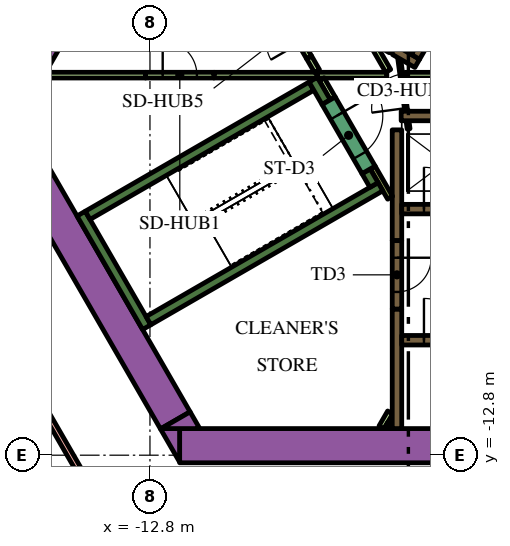
"""IFC4 building model, lengths in metres.
Left out: names, types, materials, properties, quantities, classifications, styles, units other than length and angle.
Written with IfcOpenShell. Run it as: python <this file> out.ifc"""

import sys

from ifc_helpers import new_model, si_unit, direction, frame, frame_2d, origin, place, context, subcontext, project, spatial, polyline, rectangle, outline, extrude, element, fill, save


model = new_model("IFC4")
c1 = context("Model", 3, precision=1e-05, world=origin(), true_north=direction((0.0, 1.0)))
c2 = subcontext(c1, "Body", "Model", "MODEL_VIEW")
j1 = project(units=[si_unit("LENGTHUNIT", "METRE"), si_unit("PLANEANGLEUNIT", "RADIAN")], contexts=[c1])
p1 = place(None, origin())
s1 = spatial("IfcSite", under=j1, at=p1, CompositionType="ELEMENT")
p2 = place(p1, origin())
s2 = spatial("IfcBuilding", under=s1, at=p2, CompositionType="ELEMENT")
p3 = place(p2, frame((0.0, 0.0, 134.4)))
s3 = spatial("IfcBuildingStorey", under=s2, at=p3, CompositionType="ELEMENT", Elevation=134.4)
p4 = place(p3, frame((-12.019, -12.55, 0.0), z_axis=(0.0, 0.0, 1.0), x_axis=(1.0, 0.0, 0.0)))
e1 = element("IfcWall", 1, at=p4, inside=s3, PredefinedType="SOLIDWALL", context=c2, shape_type="SweptSolid", body=[
    extrude(rectangle(XDim=21.63, YDim=0.9, at=frame_2d((10.815, 0.0))), origin(), (0.0, 0.0, 1.0), 7.2),
])
p5 = place(p3, origin())
e2 = element("IfcWall", 2, at=p5, inside=s3, PredefinedType="SOLIDWALL", context=c2, shape_type="SweptSolid", body=[
    extrude(outline(polyline([(-12.529, -12.1), (-12.021, -12.1), (-12.021, -12.98), (-12.529, -12.1)])), origin(), (0.0, 0.0, 1.0), 7.2),
])
p6 = place(p3, frame((-12.134, -11.883, 0.0), z_axis=(0.0, 0.0, 1.0), x_axis=(-0.500005339912, 0.866022320763, 0.0)))
e3 = element("IfcWall", 3, at=p6, inside=s3, PredefinedType="SOLIDWALL", context=c2, shape_type="SweptSolid", body=[
    extrude(rectangle(XDim=9.488, YDim=0.9, at=frame_2d((4.744, 0.0))), origin(), (0.0, 0.0, 1.0), 7.2),
])
e4 = element("IfcWall", 4, at=p5, inside=s3, PredefinedType="SOLIDWALL", context=c2, shape_type="SweptSolid", body=[
    extrude(outline(polyline([(-11.489, -12.1), (-12.505, -12.1), (-11.743, -11.66), (-11.489, -12.1)])), origin(), (0.0, 0.0, 1.0), 7.2),
])
p7 = place(p3, frame((-15.118, -1.085, 0.0), z_axis=(0.0, 0.0, 1.0), x_axis=(-0.50006606081, -0.865987260198, 0.0)))
e5 = element("IfcWall", 5, at=p7, inside=s3, PredefinedType="SOLIDWALL", context=c2, shape_type="SweptSolid", body=[
    extrude(rectangle(XDim=2.481, YDim=0.9, at=frame_2d((1.24, 0.0))), origin(), (0.0, 0.0, 1.0), 7.2),
])
p8 = place(p3, frame((-12.885, -9.431, 0.0), z_axis=(0.0, 0.0, 1.0), x_axis=(-0.500020560727, 0.866013532718, 0.0)))
e6 = element("IfcWall", 6, at=p8, inside=s3, PredefinedType="SOLIDWALL", context=c2, shape_type="SweptSolid", body=[
    extrude(rectangle(XDim=3.45, YDim=0.25, at=frame_2d((1.725, 0.0))), origin(), (0.0, 0.0, 1.0), 7.2),
])
p9 = place(p3, frame((-14.44, -6.49, 0.0), z_axis=(0.0, 0.0, 1.0), x_axis=(0.866022966069, 0.500004222222, 0.0)))
e7 = element("IfcWall", 7, at=p9, inside=s3, PredefinedType="SOLIDWALL", context=c2, shape_type="SweptSolid", body=[
    extrude(rectangle(XDim=6.8, YDim=0.25, at=frame_2d((3.4, 0.0))), origin(), (0.0, 0.0, 1.0), 7.2),
])
p10 = place(p3, frame((-8.163, -3.511, 0.0), z_axis=(0.0, 0.0, 1.0), x_axis=(-0.500206266495, 0.865906283012, 0.0)))
e8 = element("IfcWall", 8, at=p10, inside=s3, PredefinedType="SOLIDWALL", context=c2, shape_type="SweptSolid", body=[
    extrude(rectangle(XDim=0.684, YDim=0.25, at=frame_2d((0.342, 0.0))), origin(), (0.0, 0.0, 1.0), 7.2),
])
p11 = place(p3, frame((-12.84, -9.261, 0.0), z_axis=(0.0, 0.0, 1.0), x_axis=(0.866016039709, 0.500016218704, 0.0)))
e9 = element("IfcWall", 9, at=p11, inside=s3, PredefinedType="SOLIDWALL", context=c2, shape_type="SweptSolid", body=[
    extrude(rectangle(XDim=7.05, YDim=0.25, at=frame_2d((3.525, 0.0))), origin(), (0.0, 0.0, 1.0), 7.2),
])
p12 = place(p3, frame((-6.905, -5.69, 0.0), z_axis=(0.0, 0.0, 1.0), x_axis=(-0.499993700073, 0.866029041019, 0.0)))
e10 = element("IfcWall", 10, at=p12, inside=s3, PredefinedType="SOLIDWALL", context=c2, shape_type="SweptSolid", body=[
    extrude(rectangle(XDim=0.416, YDim=0.25, at=frame_2d((0.208, 0.0))), origin(), (0.0, 0.0, 1.0), 7.2),
])
p13 = place(p3, frame((-6.3, -12.1, 0.0), z_axis=(0.0, 0.0, 1.0), x_axis=(0.0, 1.0, 0.0)))
e11 = element("IfcWall", 11, at=p13, inside=s3, PredefinedType="SOLIDWALL", context=c2, shape_type="SweptSolid", body=[
    extrude(rectangle(XDim=3.146, YDim=0.25, at=frame_2d((1.573, 0.0))), origin(), (0.0, 0.0, 1.0), 7.2),
])
p14 = place(p3, frame((-6.3, -4.24, 0.0), z_axis=(0.0, 0.0, 1.0), x_axis=(0.0, -1.0, 0.0)))
e12 = element("IfcWall", 12, at=p14, inside=s3, PredefinedType="SOLIDWALL", context=c2, shape_type="SweptSolid", body=[
    extrude(rectangle(XDim=2.914, YDim=0.25, at=frame_2d((1.457, 0.0))), origin(), (0.0, 0.0, 1.0), 7.2),
])
p15 = place(p3, frame((-6.19, -3.875, 0.0), z_axis=(0.0, 0.0, 1.0), x_axis=(1.0, 0.0, 0.0)))
e13 = element("IfcWall", 13, at=p15, inside=s3, PredefinedType="SOLIDWALL", context=c2, shape_type="SweptSolid", body=[
    extrude(rectangle(XDim=12.615, YDim=0.25, at=frame_2d((6.307, 0.0))), origin(), (0.0, 0.0, 1.0), 7.2),
])
e14 = element("IfcWall", 14, at=p5, inside=s3, PredefinedType="SOLIDWALL", context=c2, shape_type="SweptSolid", body=[
    extrude(outline(polyline([(-5.922, -2.257), (-5.922, -2.257), (-5.705, -2.382), (-5.83, -2.598), (-6.418, -2.258), (-6.433, -2.153), (-6.433, -2.153), (-6.433, -2.153), (-6.508, -2.163), (-6.508, -2.163), (-6.508, -2.163), (-6.501, -2.21), (-7.952, -1.373), (-7.827, -1.156), (-5.922, -2.257)])), origin(), (0.0, 0.0, 1.0), 7.2),
])
p16 = place(p3, frame((-6.708, -12.068, 0.0), z_axis=(0.0, 0.0, 1.0), x_axis=(0.500000789788, 0.8660249478, 0.0)))
e15 = element("IfcWall", 15, at=p16, inside=s3, PredefinedType="PARTITIONING", context=c2, shape_type="SweptSolid", body=[
    extrude(rectangle(XDim=0.456, YDim=0.15, at=frame_2d((0.228, 0.0))), origin(), (0.0, 0.0, 1.0), 6.15),
])
p17 = place(p3, frame((-6.534, -12.068, 0.0), z_axis=(0.0, 0.0, 1.0), x_axis=(0.500240224089, 0.865886665912, 0.0)))
e16 = element("IfcWall", 16, at=p17, inside=s3, PredefinedType="PARTITIONING", context=c2, shape_type="SweptSolid", body=[
    extrude(rectangle(XDim=0.109, YDim=0.15, at=frame_2d((0.054, 0.0))), origin(), (0.0, 0.0, 1.0), 6.15),
])
p18 = place(p3, frame((-6.48, -6.027, 0.0), z_axis=(0.0, 0.0, 1.0), x_axis=(-0.499936960004, 0.866061796884, 0.0)))
e17 = element("IfcWall", 17, at=p18, inside=s3, PredefinedType="PARTITIONING", context=c2, shape_type="SweptSolid", body=[
    extrude(rectangle(XDim=0.919, YDim=0.15, at=frame_2d((0.46, 0.0))), origin(), (0.0, 0.0, 1.0), 7.2),
])
p19 = place(p3, frame((-12.915, -2.8, 0.0), z_axis=(0.0, 0.0, 1.0), x_axis=(-1.0, 0.0, 0.0)))
e18 = element("IfcWall", 18, at=p19, inside=s3, PredefinedType="PARTITIONING", context=c2, shape_type="SweptSolid", body=[
    extrude(rectangle(XDim=2.637, YDim=0.15, at=frame_2d((1.318, 0.0))), origin(), (0.0, 0.0, 1.0), 6.15),
])
p20 = place(p3, frame((-8.395, -2.8, 0.0), z_axis=(0.0, 0.0, 1.0), x_axis=(1.0, 0.0, 0.0)))
e19 = element("IfcWall", 19, at=p20, inside=s3, PredefinedType="PARTITIONING", context=c2, shape_type="SweptSolid", body=[
    extrude(rectangle(XDim=1.828, YDim=0.15, at=frame_2d((0.914, 0.0))), origin(), (0.0, 0.0, 1.0), 6.15),
])
p21 = place(p3, frame((-11.115, -2.8, 0.0), z_axis=(0.0, 0.0, 1.0), x_axis=(1.0, 0.0, 0.0)))
e20 = element("IfcWall", 20, at=p21, inside=s3, PredefinedType="PARTITIONING", context=c2, shape_type="SweptSolid", body=[
    extrude(rectangle(XDim=2.708, YDim=0.15, at=frame_2d((1.354, 0.0))), origin(), (0.0, 0.0, 1.0), 6.15),
])
p22 = place(p3, frame((-6.531, -2.689, 0.0), z_axis=(0.0, 0.0, 1.0), x_axis=(-0.499967446111, 0.866044197965, 0.0)))
e21 = element("IfcWall", 21, at=p22, inside=s3, PredefinedType="PARTITIONING", context=c2, shape_type="SweptSolid", body=[
    extrude(rectangle(XDim=0.748, YDim=0.15, at=frame_2d((0.374, 0.0))), origin(), (0.0, 0.0, 1.0), 6.15),
])
p23 = place(p3, frame((-7.99, -3.412, 0.0), z_axis=(0.0, 0.0, 1.0), x_axis=(-0.500193841991, 0.86591346013, 0.0)))
e22 = element("IfcWall", 22, at=p23, inside=s3, PredefinedType="PARTITIONING", context=c2, shape_type="SweptSolid", body=[
    extrude(rectangle(XDim=0.583, YDim=0.15, at=frame_2d((0.292, 0.0))), origin(), (0.0, 0.0, 1.0), 6.15),
])
p24 = place(p3, frame((-8.612, -2.333, 0.0), z_axis=(0.0, 0.0, 1.0), x_axis=(0.500248216681, -0.86588204838, 0.0)))
e23 = element("IfcWall", 23, at=p24, inside=s3, PredefinedType="PARTITIONING", context=c2, shape_type="SweptSolid", body=[
    extrude(rectangle(XDim=0.415, YDim=0.15, at=frame_2d((0.208, 0.0))), origin(), (0.0, 0.0, 1.0), 6.15),
])
p25 = place(p3, frame((-6.086, -2.801, 0.0), z_axis=(0.0, 0.0, 1.0), x_axis=(1.0, 0.0, 0.0)))
e24 = element("IfcWall", 24, at=p25, inside=s3, PredefinedType="PARTITIONING", context=c2, shape_type="SweptSolid", body=[
    extrude(rectangle(XDim=7.524, YDim=0.15, at=frame_2d((3.762, 0.0))), origin(), (0.0, 0.0, 1.0), 6.15),
])
p26 = place(p3, frame((-6.175, -9.775, 0.0), z_axis=(0.0, 0.0, 1.0), x_axis=(1.0, 0.0, 0.0)))
e25 = element("IfcWall", 25, at=p26, inside=s3, PredefinedType="SOLIDWALL", context=c2, shape_type="SweptSolid", body=[
    extrude(rectangle(XDim=12.35, YDim=0.25, at=frame_2d((6.175, 0.0))), origin(), (0.0, 0.0, 1.0), 7.2),
])
p27 = place(p26, frame((0.585, 0.0, 0.0)))
e26 = element("IfcOpeningElement", 26, at=p27, cuts=e25, PredefinedType="OPENING", context=c2, shape_type="SweptSolid", body=[
    extrude(rectangle(XDim=1.1, YDim=2.1, at=frame_2d((0.55, 1.05))), frame((0.0, 0.135, 0.0), z_axis=(0.0, -1.0, 0.0), x_axis=(1.0, 0.0, 0.0)), (0.0, 0.0, 1.0), 0.27),
])
p28 = place(p26, frame((3.105, 0.0, 0.0)))
e27 = element("IfcOpeningElement", 27, at=p28, cuts=e25, PredefinedType="OPENING", context=c2, shape_type="SweptSolid", body=[
    extrude(rectangle(XDim=1.1, YDim=2.1, at=frame_2d((0.55, 1.05))), frame((0.0, 0.135, 0.0), z_axis=(0.0, -1.0, 0.0), x_axis=(1.0, 0.0, 0.0)), (0.0, 0.0, 1.0), 0.27),
])
p29 = place(p26, frame((5.625, 0.0, 0.0)))
e28 = element("IfcOpeningElement", 28, at=p29, cuts=e25, PredefinedType="OPENING", context=c2, shape_type="SweptSolid", body=[
    extrude(rectangle(XDim=1.1, YDim=2.1, at=frame_2d((0.55, 1.05))), frame((0.0, 0.135, 0.0), z_axis=(0.0, -1.0, 0.0), x_axis=(1.0, 0.0, 0.0)), (0.0, 0.0, 1.0), 0.27),
])
p30 = place(p26, frame((8.145, 0.0, 0.0)))
e29 = element("IfcOpeningElement", 29, at=p30, cuts=e25, PredefinedType="OPENING", context=c2, shape_type="SweptSolid", body=[
    extrude(rectangle(XDim=1.1, YDim=2.1, at=frame_2d((0.55, 1.05))), frame((0.0, 0.135, 0.0), z_axis=(0.0, -1.0, 0.0), x_axis=(1.0, 0.0, 0.0)), (0.0, 0.0, 1.0), 0.27),
])
p31 = place(p26, frame((10.665, 0.0, 0.0)))
e30 = element("IfcOpeningElement", 30, at=p31, cuts=e25, PredefinedType="OPENING", context=c2, shape_type="SweptSolid", body=[
    extrude(rectangle(XDim=1.1, YDim=2.1, at=frame_2d((0.55, 1.05))), frame((0.0, 0.135, 0.0), z_axis=(0.0, -1.0, 0.0), x_axis=(1.0, 0.0, 0.0)), (0.0, 0.0, 1.0), 0.27),
])
p32 = place(p3, frame((-6.175, -6.325, 0.0), z_axis=(0.0, 0.0, 1.0), x_axis=(1.0, 0.0, 0.0)))
e31 = element("IfcWall", 31, at=p32, inside=s3, PredefinedType="SOLIDWALL", context=c2, shape_type="SweptSolid", body=[
    extrude(rectangle(XDim=12.35, YDim=0.25, at=frame_2d((6.175, 0.0))), origin(), (0.0, 0.0, 1.0), 7.2),
])
p33 = place(p32, frame((0.585, 0.0, 0.0)))
e32 = element("IfcOpeningElement", 32, at=p33, cuts=e31, PredefinedType="OPENING", context=c2, shape_type="SweptSolid", body=[
    extrude(rectangle(XDim=1.1, YDim=2.1, at=frame_2d((0.55, 1.05))), frame((0.0, 0.135, 0.0), z_axis=(0.0, -1.0, 0.0), x_axis=(1.0, 0.0, 0.0)), (0.0, 0.0, 1.0), 0.27),
])
p34 = place(p32, frame((3.105, 0.0, 0.0)))
e33 = element("IfcOpeningElement", 33, at=p34, cuts=e31, PredefinedType="OPENING", context=c2, shape_type="SweptSolid", body=[
    extrude(rectangle(XDim=1.1, YDim=2.1, at=frame_2d((0.55, 1.05))), frame((0.0, 0.135, 0.0), z_axis=(0.0, -1.0, 0.0), x_axis=(1.0, 0.0, 0.0)), (0.0, 0.0, 1.0), 0.27),
])
p35 = place(p32, frame((5.625, 0.0, 0.0)))
e34 = element("IfcOpeningElement", 34, at=p35, cuts=e31, PredefinedType="OPENING", context=c2, shape_type="SweptSolid", body=[
    extrude(rectangle(XDim=1.1, YDim=2.1, at=frame_2d((0.55, 1.05))), frame((0.0, 0.135, 0.0), z_axis=(0.0, -1.0, 0.0), x_axis=(1.0, 0.0, 0.0)), (0.0, 0.0, 1.0), 0.27),
])
p36 = place(p32, frame((8.145, 0.0, 0.0)))
e35 = element("IfcOpeningElement", 35, at=p36, cuts=e31, PredefinedType="OPENING", context=c2, shape_type="SweptSolid", body=[
    extrude(rectangle(XDim=1.1, YDim=2.1, at=frame_2d((0.55, 1.05))), frame((0.0, 0.135, 0.0), z_axis=(0.0, -1.0, 0.0), x_axis=(1.0, 0.0, 0.0)), (0.0, 0.0, 1.0), 0.27),
])
p37 = place(p32, frame((10.665, 0.0, 0.0)))
e36 = element("IfcOpeningElement", 36, at=p37, cuts=e31, PredefinedType="OPENING", context=c2, shape_type="SweptSolid", body=[
    extrude(rectangle(XDim=1.1, YDim=2.1, at=frame_2d((0.55, 1.05))), frame((0.0, 0.135, 0.0), z_axis=(0.0, -1.0, 0.0), x_axis=(1.0, 0.0, 0.0)), (0.0, 0.0, 1.0), 0.27),
])
p38 = place(p3, frame((-0.898, 6.194, 0.0), z_axis=(0.0, 0.0, 1.0), x_axis=(-0.499996202215, -0.866027596426, 0.0)))
e37 = element("IfcWall", 37, at=p38, inside=s3, PredefinedType="SOLIDWALL", context=c2, shape_type="SweptSolid", body=[
    extrude(rectangle(XDim=9.83, YDim=0.25, at=frame_2d((4.915, 0.0))), origin(), (0.0, 0.0, 1.0), 7.2),
])
p39 = place(p38, frame((0.585, 0.0, 0.0)))
e38 = element("IfcOpeningElement", 38, at=p39, cuts=e37, PredefinedType="OPENING", context=c2, shape_type="SweptSolid", body=[
    extrude(rectangle(XDim=1.1, YDim=2.1, at=frame_2d((0.55, 1.05))), frame((0.0, 0.135, 0.0), z_axis=(0.0, -1.0, 0.0), x_axis=(1.0, 0.0, 0.0)), (0.0, 0.0, 1.0), 0.27),
])
p40 = place(p38, frame((3.105, 0.0, 0.0)))
e39 = element("IfcOpeningElement", 39, at=p40, cuts=e37, PredefinedType="OPENING", context=c2, shape_type="SweptSolid", body=[
    extrude(rectangle(XDim=1.1, YDim=2.1, at=frame_2d((0.55, 1.05))), frame((0.0, 0.135, 0.0), z_axis=(0.0, -1.0, 0.0), x_axis=(1.0, 0.0, 0.0)), (0.0, 0.0, 1.0), 0.27),
])
p41 = place(p38, frame((5.625, 0.0, 0.0)))
e40 = element("IfcOpeningElement", 40, at=p41, cuts=e37, PredefinedType="OPENING", context=c2, shape_type="SweptSolid", body=[
    extrude(rectangle(XDim=1.1, YDim=2.1, at=frame_2d((0.55, 1.05))), frame((0.0, 0.135, 0.0), z_axis=(0.0, -1.0, 0.0), x_axis=(1.0, 0.0, 0.0)), (0.0, 0.0, 1.0), 0.27),
])
p42 = place(p38, frame((8.145, 0.0, 0.0)))
e41 = element("IfcOpeningElement", 41, at=p42, cuts=e37, PredefinedType="OPENING", context=c2, shape_type="SweptSolid", body=[
    extrude(rectangle(XDim=1.1, YDim=2.1, at=frame_2d((0.55, 1.05))), frame((0.0, 0.135, 0.0), z_axis=(0.0, -1.0, 0.0), x_axis=(1.0, 0.0, 0.0)), (0.0, 0.0, 1.0), 0.27),
])
p43 = place(p3, frame((-8.098, -3.474, 0.0), z_axis=(0.0, 0.0, 1.0), x_axis=(0.49994051562, -0.866059744384, 0.0)))
e42 = element("IfcWall", 42, at=p43, inside=s3, PredefinedType="SOLIDWALL", context=c2, shape_type="SweptSolid", body=[
    extrude(rectangle(XDim=2.1, YDim=0.4, at=frame_2d((1.05, 0.0))), origin(), (0.0, 0.0, 1.0), 7.2),
])
p44 = place(p43, frame((0.45, 0.0, 0.0)))
e43 = element("IfcOpeningElement", 43, at=p44, cuts=e42, PredefinedType="OPENING", context=c2, shape_type="SweptSolid", body=[
    extrude(rectangle(XDim=1.2, YDim=2.1, at=frame_2d((0.6, 1.05))), frame((0.0, 0.21, 0.0), z_axis=(0.0, -1.0, 0.0), x_axis=(1.0, 0.0, 0.0)), (0.0, 0.0, 1.0), 0.42),
])
p45 = place(p3, frame((-6.3, -7.154, 0.0), z_axis=(0.0, 0.0, 1.0), x_axis=(0.0, -1.0, 0.0)))
e44 = element("IfcWall", 44, at=p45, inside=s3, PredefinedType="SOLIDWALL", context=c2, shape_type="SweptSolid", body=[
    extrude(rectangle(XDim=1.8, YDim=0.25, at=frame_2d((0.9, 0.0))), origin(), (0.0, 0.0, 1.0), 7.2),
])
p46 = place(p45, frame((0.45, 0.0, 0.0)))
e45 = element("IfcOpeningElement", 45, at=p46, cuts=e44, PredefinedType="OPENING", context=c2, shape_type="SweptSolid", body=[
    extrude(rectangle(XDim=0.9, YDim=2.1, at=frame_2d((0.45, 1.05))), frame((0.0, 0.135, 0.0), z_axis=(0.0, -1.0, 0.0), x_axis=(1.0, 0.0, 0.0)), (0.0, 0.0, 1.0), 0.27),
])
p47 = place(p3, frame((-5.995, -4.213, 0.0), z_axis=(0.0, 0.0, 1.0), x_axis=(-0.132072335448, 0.991240081014, 0.0)))
e46 = element("IfcWall", 46, at=p47, inside=s3, PredefinedType="PARTITIONING", context=c2, shape_type="SweptSolid", body=[
    extrude(rectangle(XDim=2.1, YDim=0.076, at=frame_2d((1.05, 0.0))), origin(), (0.0, 0.0, 1.0), 6.15),
])
p48 = place(p47, frame((0.55, 0.0, 0.0)))
e47 = element("IfcOpeningElement", 47, at=p48, cuts=e46, PredefinedType="OPENING", context=c2, shape_type="SweptSolid", body=[
    extrude(rectangle(XDim=0.9, YDim=2.1, at=frame_2d((0.45, 1.05))), frame((0.0, 0.048, 0.0), z_axis=(0.0, -1.0, 0.0), x_axis=(1.0, 0.0, 0.0)), (0.0, 0.0, 1.0), 0.096),
])
p49 = place(p3, frame((-12.915, -2.8, 0.0), z_axis=(0.0, 0.0, 1.0), x_axis=(1.0, 0.0, 0.0)))
e48 = element("IfcWall", 48, at=p49, inside=s3, PredefinedType="PARTITIONING", context=c2, shape_type="SweptSolid", body=[
    extrude(rectangle(XDim=1.8, YDim=0.15, at=frame_2d((0.9, 0.0))), origin(), (0.0, 0.0, 1.0), 6.15),
])
p50 = place(p49, frame((0.45, 0.0, 0.0)))
e49 = element("IfcOpeningElement", 49, at=p50, cuts=e48, PredefinedType="OPENING", context=c2, shape_type="SweptSolid", body=[
    extrude(rectangle(XDim=0.9, YDim=2.1, at=frame_2d((0.45, 1.05))), frame((0.0, 0.085, 0.0), z_axis=(0.0, -1.0, 0.0), x_axis=(1.0, 0.0, 0.0)), (0.0, 0.0, 1.0), 0.17),
])
p51 = place(p3, frame((-8.612, -2.333, 0.0), z_axis=(0.0, 0.0, 1.0), x_axis=(-0.499961193289, 0.866047807691, 0.0)))
e50 = element("IfcWall", 50, at=p51, inside=s3, PredefinedType="PARTITIONING", context=c2, shape_type="SweptSolid", body=[
    extrude(rectangle(XDim=1.8, YDim=0.15, at=frame_2d((0.9, 0.0))), origin(), (0.0, 0.0, 1.0), 6.15),
])
p52 = place(p51, frame((0.45, 0.0, 0.0)))
e51 = element("IfcOpeningElement", 51, at=p52, cuts=e50, PredefinedType="OPENING", context=c2, shape_type="SweptSolid", body=[
    extrude(rectangle(XDim=0.9, YDim=2.1, at=frame_2d((0.45, 1.05))), frame((0.0, 0.085, 0.0), z_axis=(0.0, -1.0, 0.0), x_axis=(1.0, 0.0, 0.0)), (0.0, 0.0, 1.0), 0.17),
])
p53 = place(p3, frame((-13.429, -15.339, 0.0), z_axis=(0.0, 0.0, 1.0), x_axis=(-0.500006123685, 0.866021868245, 0.0)))
e52 = element("IfcWall", 52, at=p53, inside=s3, PredefinedType="PARTITIONING", context=c2, shape_type="SweptSolid", body=[
    extrude(rectangle(XDim=5.29, YDim=0.15, at=frame_2d((2.645, 0.0))), origin(), (0.0, 0.0, 1.0), 6.15),
])
p54 = place(p27, origin())
e53 = element("IfcDoor", 53, at=p54, inside=s3, OperationType="DOUBLE_DOOR_SLIDING", PredefinedType="DOOR", context=c2, shape_type="SweptSolid", body=[
    extrude(rectangle(XDim=1.1, YDim=2.1, at=frame_2d((0.55, 1.05))), frame((0.0, 0.025, 0.0), z_axis=(0.0, -1.0, 0.0), x_axis=(1.0, 0.0, 0.0)), (0.0, 0.0, 1.0), 0.05),
])
fill(e26, e53)
p55 = place(p33, origin())
e54 = element("IfcDoor", 54, at=p55, inside=s3, OperationType="DOUBLE_DOOR_SLIDING", PredefinedType="DOOR", context=c2, shape_type="SweptSolid", body=[
    extrude(rectangle(XDim=1.1, YDim=2.1, at=frame_2d((0.55, 1.05))), frame((0.0, 0.025, 0.0), z_axis=(0.0, -1.0, 0.0), x_axis=(1.0, 0.0, 0.0)), (0.0, 0.0, 1.0), 0.05),
])
fill(e32, e54)
p56 = place(p44, origin())
e55 = element("IfcDoor", 55, at=p56, inside=s3, OperationType="SINGLE_SWING_LEFT", PredefinedType="DOOR", context=c2, shape_type="SweptSolid", body=[
    extrude(rectangle(XDim=1.2, YDim=2.1, at=frame_2d((0.6, 1.05))), frame((0.0, 0.025, 0.0), z_axis=(0.0, -1.0, 0.0), x_axis=(1.0, 0.0, 0.0)), (0.0, 0.0, 1.0), 0.05),
])
fill(e43, e55)
p57 = place(p46, origin())
e56 = element("IfcDoor", 56, at=p57, inside=s3, OperationType="SINGLE_SWING_LEFT", PredefinedType="DOOR", context=c2, shape_type="SweptSolid", body=[
    extrude(rectangle(XDim=0.9, YDim=2.1, at=frame_2d((0.45, 1.05))), frame((0.0, 0.025, 0.0), z_axis=(0.0, -1.0, 0.0), x_axis=(1.0, 0.0, 0.0)), (0.0, 0.0, 1.0), 0.05),
])
fill(e45, e56)
p58 = place(p48, origin())
e57 = element("IfcDoor", 57, at=p58, inside=s3, OperationType="SINGLE_SWING_LEFT", PredefinedType="DOOR", context=c2, shape_type="SweptSolid", body=[
    extrude(rectangle(XDim=0.9, YDim=2.1, at=frame_2d((0.45, 1.05))), frame((0.0, 0.025, 0.0), z_axis=(0.0, -1.0, 0.0), x_axis=(1.0, 0.0, 0.0)), (0.0, 0.0, 1.0), 0.05),
])
fill(e47, e57)
p59 = place(p50, origin())
e58 = element("IfcDoor", 58, at=p59, inside=s3, OperationType="SINGLE_SWING_LEFT", PredefinedType="DOOR", context=c2, shape_type="SweptSolid", body=[
    extrude(rectangle(XDim=0.9, YDim=2.1, at=frame_2d((0.45, 1.05))), frame((0.0, 0.025, 0.0), z_axis=(0.0, -1.0, 0.0), x_axis=(1.0, 0.0, 0.0)), (0.0, 0.0, 1.0), 0.05),
])
fill(e49, e58)
save(model, sys.argv[1])
